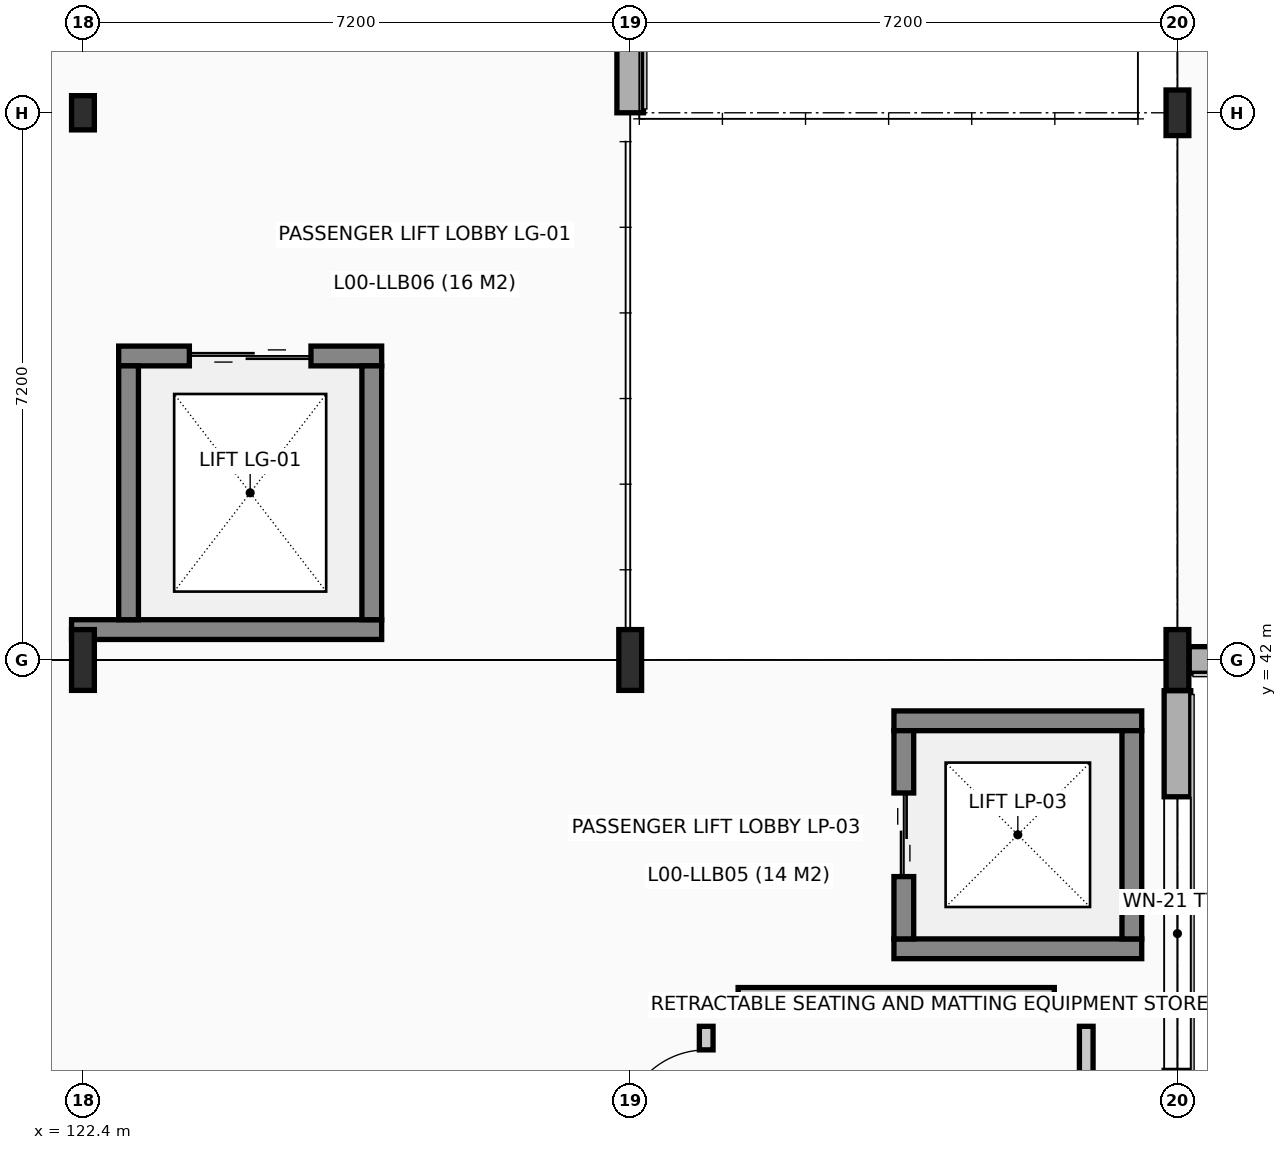
"""IFC4 building model, lengths in metres.
Left out: names, types, materials, properties, quantities, classifications, styles, units other than length and angle.
Written with IfcOpenShell. Run it as: python <this file> out.ifc"""

import sys

from ifc_helpers import new_model, si_unit, direction, frame, frame_2d, origin, origin_2d, place, context, subcontext, project, spatial, rectangle, i_section, extrude, element, fill, save


model = new_model("IFC4")
c1 = context("Model", 3, precision=1e-05, world=origin(), true_north=direction((0.0, 1.0)))
c2 = subcontext(c1, "Body", "Model", "MODEL_VIEW")
j1 = project(units=[si_unit("LENGTHUNIT", "METRE"), si_unit("PLANEANGLEUNIT", "RADIAN")], contexts=[c1])
p1 = place(None, origin())
s1 = spatial("IfcSite", under=j1, at=p1, CompositionType="ELEMENT")
p2 = place(p1, origin())
s2 = spatial("IfcBuilding", under=s1, at=p2, CompositionType="ELEMENT")
p3 = place(p2, origin())
s3 = spatial("IfcBuildingStorey", under=s2, at=p3, CompositionType="ELEMENT", Elevation=0.0)
p4 = place(p3, frame((122.4, 42.0, 0.0), z_axis=(0.0, 0.0, 1.0), x_axis=(1.0, 0.0, 0.0)))
e1 = element("IfcColumn", 1, at=p4, inside=s3, PredefinedType="COLUMN", context=c2, shape_type="SweptSolid", body=[
    extrude(i_section(OverallWidth=0.3, OverallDepth=0.8, WebThickness=0.018, FlangeThickness=0.033, at=origin_2d()), origin(), (0.0, 0.0, 1.0), 4.8),
])
p5 = place(p3, frame((122.4, 49.2, 0.0), z_axis=(0.0, 0.0, 1.0), x_axis=(1.0, 0.0, 0.0)))
e2 = element("IfcColumn", 2, at=p5, inside=s3, PredefinedType="COLUMN", context=c2, shape_type="SweptSolid", body=[
    extrude(i_section(OverallWidth=0.3, OverallDepth=0.45, WebThickness=0.014, FlangeThickness=0.026, at=origin_2d()), origin(), (0.0, 0.0, 1.0), 4.8),
])
for number, where, z_axis, x_axis in (
    (3, (129.6, 42.0, 0.0), (0.0, 0.0, 1.0), (1.0, 0.0, 0.0)),
    (4, (136.8, 42.0, 0.0), (0.0, 0.0, 1.0), (1.0, 0.0, 0.0)),
):
    element("IfcColumn", number, at=place(p3, frame(where, z_axis=z_axis, x_axis=x_axis)), inside=s3, PredefinedType="COLUMN", context=c2, shape_type="SweptSolid", body=[
        extrude(i_section(OverallWidth=0.3, OverallDepth=0.8, WebThickness=0.018, FlangeThickness=0.033, at=origin_2d()), origin(), (0.0, 0.0, 1.0), 4.8),
    ])
p6 = place(p3, frame((136.8, 49.2, 0.0), z_axis=(0.0, 0.0, 1.0), x_axis=(1.0, 0.0, 0.0)))
e5 = element("IfcColumn", 5, at=p6, inside=s3, PredefinedType="COLUMN", context=c2, shape_type="SweptSolid", body=[
    extrude(i_section(OverallWidth=0.3, OverallDepth=0.6, WebThickness=0.015, FlangeThickness=0.03, at=origin_2d()), origin(), (0.0, 0.0, 1.0), 4.8),
])
p7 = place(p3, frame((136.8, 35.104, 0.0), z_axis=(0.0, 0.0, 1.0), x_axis=(0.0, 1.0, 0.0)))
e6 = element("IfcWall", 6, at=p7, inside=s3, PredefinedType="SOLIDWALL", context=c2, shape_type="SweptSolid", body=[
    extrude(rectangle(XDim=6.492, YDim=0.35, at=frame_2d((3.246, 0.0))), origin(), (0.0, 0.0, 1.0), 4.065),
])
p8 = place(p7, frame((1.496, 0.0, 1.0)))
e7 = element("IfcOpeningElement", 7, at=p8, cuts=e6, PredefinedType="OPENING", context=c2, shape_type="SweptSolid", body=[
    extrude(rectangle(XDim=3.6, YDim=1.4, at=frame_2d((1.8, 0.7))), frame((0.0, 0.185, 0.0), z_axis=(0.0, -1.0, 0.0), x_axis=(1.0, 0.0, 0.0)), (0.0, 0.0, 1.0), 0.37),
])
p9 = place(p3, frame((129.6, 49.2, 0.0), z_axis=(0.0, 0.0, 1.0), x_axis=(0.0, 1.0, 0.0)))
e8 = element("IfcWall", 8, at=p9, inside=s3, PredefinedType="SOLIDWALL", context=c2, shape_type="SweptSolid", body=[
    extrude(rectangle(XDim=7.2, YDim=0.35, at=frame_2d((3.6, 0.0))), origin(), (0.0, 0.0, 1.0), 4.56),
])
p10 = place(p3, frame((136.954, 42.0, 0.0), z_axis=(0.0, 0.0, 1.0), x_axis=(1.0, 0.0, 0.0)))
e9 = element("IfcWall", 9, at=p10, inside=s3, PredefinedType="SOLIDWALL", context=c2, shape_type="SweptSolid", body=[
    extrude(rectangle(XDim=6.892, YDim=0.35, at=frame_2d((3.446, 0.0))), origin(), (0.0, 0.0, 1.0), 4.165),
])
p11 = place(p10, frame((1.646, 0.0, 1.0)))
e10 = element("IfcOpeningElement", 10, at=p11, cuts=e9, PredefinedType="OPENING", context=c2, shape_type="SweptSolid", body=[
    extrude(rectangle(XDim=3.6, YDim=1.4, at=frame_2d((1.8, 0.7))), frame((0.0, 0.185, 0.0), z_axis=(0.0, -1.0, 0.0), x_axis=(1.0, 0.0, 0.0)), (0.0, 0.0, 1.0), 0.37),
])
for number, where, z_axis, x_axis in (
    (11, (133.07, 38.2, 0.0), (0.0, 0.0, 1.0), (1.0, 0.0, 0.0)),
    (12, (133.07, 41.2, 0.0), (0.0, 0.0, 1.0), (1.0, 0.0, 0.0)),
):
    element("IfcWall", number, at=place(p3, frame(where, z_axis=z_axis, x_axis=x_axis)), inside=s3, PredefinedType="SHEAR", context=c2, shape_type="SweptSolid", body=[
        extrude(rectangle(XDim=3.26, YDim=0.26, at=frame_2d((1.63, 0.0))), origin(), (0.0, 0.0, 1.0), 4.58),
    ])
p12 = place(p3, frame((133.2, 38.33, 0.0), z_axis=(0.0, 0.0, 1.0), x_axis=(0.0, 1.0, 0.0)))
e13 = element("IfcWall", 13, at=p12, inside=s3, PredefinedType="SHEAR", context=c2, shape_type="SweptSolid", body=[
    extrude(rectangle(XDim=2.74, YDim=0.26, at=frame_2d((1.37, 0.0))), origin(), (0.0, 0.0, 1.0), 4.58),
])
p13 = place(p12, frame((0.82, 0.0, 0.0)))
e14 = element("IfcOpeningElement", 14, at=p13, cuts=e13, PredefinedType="OPENING", context=c2, shape_type="SweptSolid", body=[
    extrude(rectangle(XDim=1.1, YDim=2.15, at=frame_2d((0.55, 1.075))), frame((0.0, 0.14, 0.0), z_axis=(0.0, -1.0, 0.0), x_axis=(1.0, 0.0, 0.0)), (0.0, 0.0, 1.0), 0.28),
])
p14 = place(p3, frame((136.2, 38.33, 0.0), z_axis=(0.0, 0.0, 1.0), x_axis=(0.0, 1.0, 0.0)))
e15 = element("IfcWall", 15, at=p14, inside=s3, PredefinedType="SHEAR", context=c2, shape_type="SweptSolid", body=[
    extrude(rectangle(XDim=2.74, YDim=0.26, at=frame_2d((1.37, 0.0))), origin(), (0.0, 0.0, 1.0), 4.58),
])
p15 = place(p3, frame((122.25, 42.4, 0.0), z_axis=(0.0, 0.0, 1.0), x_axis=(1.0, 0.0, 0.0)))
e16 = element("IfcWall", 16, at=p15, inside=s3, PredefinedType="SHEAR", context=c2, shape_type="SweptSolid", body=[
    extrude(rectangle(XDim=4.08, YDim=0.26, at=frame_2d((2.04, 0.0))), origin(), (0.0, 0.0, 1.0), 4.58),
])
p16 = place(p3, frame((122.87, 46.0, 0.0), z_axis=(0.0, 0.0, 1.0), x_axis=(1.0, 0.0, 0.0)))
e17 = element("IfcWall", 17, at=p16, inside=s3, PredefinedType="SHEAR", context=c2, shape_type="SweptSolid", body=[
    extrude(rectangle(XDim=3.46, YDim=0.26, at=frame_2d((1.73, 0.0))), origin(), (0.0, 0.0, 1.0), 4.58),
])
p17 = place(p16, frame((0.93, 0.0, 0.0)))
e18 = element("IfcOpeningElement", 18, at=p17, cuts=e17, PredefinedType="OPENING", context=c2, shape_type="SweptSolid", body=[
    extrude(rectangle(XDim=1.6, YDim=2.3, at=frame_2d((0.8, 1.15))), frame((0.0, 0.14, 0.0), z_axis=(0.0, -1.0, 0.0), x_axis=(1.0, 0.0, 0.0)), (0.0, 0.0, 1.0), 0.28),
])
for number, where, z_axis, x_axis in (
    (19, (123.0, 42.53, 0.0), (0.0, 0.0, 1.0), (0.0, 1.0, 0.0)),
    (20, (126.2, 42.53, 0.0), (0.0, 0.0, 1.0), (0.0, 1.0, 0.0)),
):
    element("IfcWall", number, at=place(p3, frame(where, z_axis=z_axis, x_axis=x_axis)), inside=s3, PredefinedType="SHEAR", context=c2, shape_type="SweptSolid", body=[
        extrude(rectangle(XDim=3.34, YDim=0.26, at=frame_2d((1.67, 0.0))), origin(), (0.0, 0.0, 1.0), 4.58),
    ])
p18 = place(p3, frame((131.02, 37.6, 0.0), z_axis=(0.0, 0.0, 1.0), x_axis=(1.0, 0.0, 0.0)))
e21 = element("IfcWall", 21, at=p18, inside=s3, PredefinedType="PARTITIONING", context=c2, shape_type="SweptSolid", body=[
    extrude(rectangle(XDim=4.16, YDim=0.18, at=frame_2d((2.08, 0.0))), origin(), (0.0, 0.0, 1.0), 4.565),
])
p19 = place(p3, frame((130.6, 33.62, 0.0), z_axis=(0.0, 0.0, 1.0), x_axis=(0.0, 1.0, 0.0)))
e22 = element("IfcWall", 22, at=p19, inside=s3, PredefinedType="PARTITIONING", context=c2, shape_type="SweptSolid", body=[
    extrude(rectangle(XDim=3.56, YDim=0.18, at=frame_2d((1.78, 0.0))), origin(), (0.0, 0.0, 1.0), 4.565),
])
p20 = place(p19, frame((2.15, 0.0, 0.0)))
e23 = element("IfcOpeningElement", 23, at=p20, cuts=e22, PredefinedType="OPENING", context=c2, shape_type="SweptSolid", body=[
    extrude(rectangle(XDim=1.1, YDim=2.15, at=frame_2d((0.55, 1.075))), frame((0.0, 0.1, 0.0), z_axis=(0.0, -1.0, 0.0), x_axis=(1.0, 0.0, 0.0)), (0.0, 0.0, 1.0), 0.2),
])
p21 = place(p3, frame((135.6, 33.62, 0.0), z_axis=(0.0, 0.0, 1.0), x_axis=(0.0, 1.0, 0.0)))
e24 = element("IfcWall", 24, at=p21, inside=s3, PredefinedType="PARTITIONING", context=c2, shape_type="SweptSolid", body=[
    extrude(rectangle(XDim=3.56, YDim=0.18, at=frame_2d((1.78, 0.0))), origin(), (0.0, 0.0, 1.0), 4.565),
])
p22 = place(p8, origin())
e25 = element("IfcWindow", 25, at=p22, inside=s3, PartitioningType="SINGLE_PANEL", PredefinedType="WINDOW", context=c2, shape_type="SweptSolid", body=[
    extrude(rectangle(XDim=3.6, YDim=1.4, at=frame_2d((1.8, 0.7))), frame((0.0, 0.03, 0.0), z_axis=(0.0, -1.0, 0.0), x_axis=(1.0, 0.0, 0.0)), (0.0, 0.0, 1.0), 0.06),
])
fill(e7, e25)
p23 = place(p13, origin())
e26 = element("IfcDoor", 26, at=p23, inside=s3, OperationType="DOUBLE_DOOR_SLIDING", PredefinedType="DOOR", context=c2, shape_type="SweptSolid", body=[
    extrude(rectangle(XDim=1.1, YDim=2.15, at=frame_2d((0.55, 1.075))), frame((0.0, 0.025, 0.0), z_axis=(0.0, -1.0, 0.0), x_axis=(1.0, 0.0, 0.0)), (0.0, 0.0, 1.0), 0.05),
])
fill(e14, e26)
p24 = place(p17, origin())
e27 = element("IfcDoor", 27, at=p24, inside=s3, OperationType="DOUBLE_DOOR_SLIDING", PredefinedType="DOOR", context=c2, shape_type="SweptSolid", body=[
    extrude(rectangle(XDim=1.6, YDim=2.3, at=frame_2d((0.8, 1.15))), frame((0.0, 0.025, 0.0), z_axis=(0.0, -1.0, 0.0), x_axis=(1.0, 0.0, 0.0)), (0.0, 0.0, 1.0), 0.05),
])
fill(e18, e27)
p25 = place(p20, frame((1.1, 0.0, 0.0), z_axis=(0.0, 0.0, 1.0), x_axis=(-1.0, 0.0, 0.0)))
e28 = element("IfcDoor", 28, at=p25, inside=s3, OperationType="SINGLE_SWING_RIGHT", PredefinedType="DOOR", context=c2, shape_type="SweptSolid", body=[
    extrude(rectangle(XDim=1.1, YDim=2.15, at=frame_2d((0.55, 1.075))), frame((0.0, 0.025, 0.0), z_axis=(0.0, -1.0, 0.0), x_axis=(1.0, 0.0, 0.0)), (0.0, 0.0, 1.0), 0.05),
])
fill(e23, e28)
save(model, sys.argv[1])
